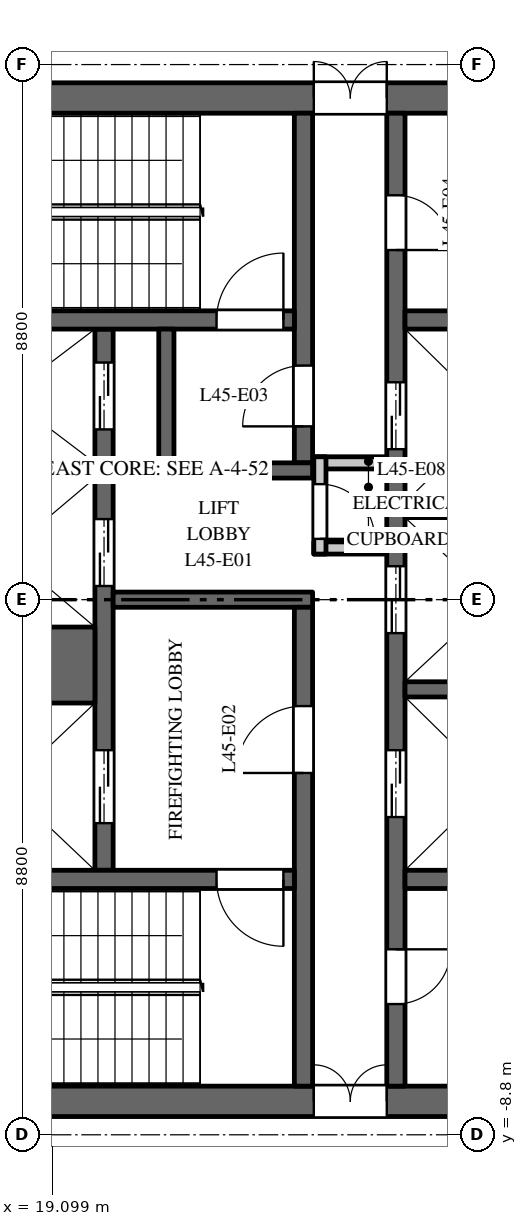
"""IFC4 building model, lengths in metres.
Left out: names, types, materials, properties, quantities, classifications, styles, units other than length and angle.
Written with IfcOpenShell. Run it as: python <this file> out.ifc"""

import sys

from ifc_helpers import new_model, si_unit, direction, frame, frame_2d, origin, place, context, subcontext, project, spatial, rectangle, extrude, element, fill, save


model = new_model("IFC4")
c1 = context("Model", 3, precision=1e-05, world=origin(), true_north=direction((0.0, 1.0)))
c2 = subcontext(c1, "Body", "Model", "MODEL_VIEW")
j1 = project(units=[si_unit("LENGTHUNIT", "METRE"), si_unit("PLANEANGLEUNIT", "RADIAN")], contexts=[c1])
p1 = place(None, origin())
s1 = spatial("IfcSite", under=j1, at=p1, CompositionType="ELEMENT")
p2 = place(p1, origin())
s2 = spatial("IfcBuilding", under=s1, at=p2, CompositionType="ELEMENT")
p3 = place(p2, frame((0.0, 0.0, 194.0)))
s3 = spatial("IfcBuildingStorey", under=s2, at=p3, CompositionType="ELEMENT", Elevation=194.0)
p4 = place(p3, frame((16.5, 8.25, 0.0), z_axis=(0.0, 0.0, 1.0), x_axis=(1.0, 0.0, 0.0)))
e1 = element("IfcWall", 1, at=p4, inside=s3, PredefinedType="SHEAR", context=c2, shape_type="SweptSolid", body=[
    extrude(rectangle(XDim=15.0, YDim=0.5, at=frame_2d((7.5, 0.0))), origin(), (0.0, 0.0, 1.0), 3.7),
])
p5 = place(p4, frame((6.9, 0.0, 0.0)))
e2 = element("IfcOpeningElement", 2, at=p5, cuts=e1, PredefinedType="OPENING", context=c2, shape_type="SweptSolid", body=[
    extrude(rectangle(XDim=1.2, YDim=2.1, at=frame_2d((0.6, 1.05))), frame((0.0, 0.26, 0.0), z_axis=(0.0, -1.0, 0.0), x_axis=(1.0, 0.0, 0.0)), (0.0, 0.0, 1.0), 0.52),
])
p6 = place(p4, frame((12.05, 0.0, 0.0)))
e3 = element("IfcOpeningElement", 3, at=p6, cuts=e1, PredefinedType="OPENING", context=c2, shape_type="SweptSolid", body=[
    extrude(rectangle(XDim=0.9, YDim=2.1, at=frame_2d((0.45, 1.05))), frame((0.0, 0.26, 0.0), z_axis=(0.0, -1.0, 0.0), x_axis=(1.0, 0.0, 0.0)), (0.0, 0.0, 1.0), 0.52),
])
p7 = place(p3, frame((16.5, -8.25, 0.0), z_axis=(0.0, 0.0, 1.0), x_axis=(1.0, 0.0, 0.0)))
e4 = element("IfcWall", 4, at=p7, inside=s3, PredefinedType="SHEAR", context=c2, shape_type="SweptSolid", body=[
    extrude(rectangle(XDim=15.0, YDim=0.5, at=frame_2d((7.5, 0.0))), origin(), (0.0, 0.0, 1.0), 3.7),
])
p8 = place(p7, frame((6.9, 0.0, 0.0)))
e5 = element("IfcOpeningElement", 5, at=p8, cuts=e4, PredefinedType="OPENING", context=c2, shape_type="SweptSolid", body=[
    extrude(rectangle(XDim=1.2, YDim=2.1, at=frame_2d((0.6, 1.05))), frame((0.0, 0.26, 0.0), z_axis=(0.0, -1.0, 0.0), x_axis=(1.0, 0.0, 0.0)), (0.0, 0.0, 1.0), 0.52),
])
p9 = place(p7, frame((12.425, 0.0, 0.0)))
e6 = element("IfcOpeningElement", 6, at=p9, cuts=e4, PredefinedType="OPENING", context=c2, shape_type="SweptSolid", body=[
    extrude(rectangle(XDim=0.9, YDim=2.1, at=frame_2d((0.45, 1.05))), frame((0.0, 0.26, 0.0), z_axis=(0.0, -1.0, 0.0), x_axis=(1.0, 0.0, 0.0)), (0.0, 0.0, 1.0), 0.52),
])
p10 = place(p3, frame((19.95, -4.45, 0.0), z_axis=(0.0, 0.0, 1.0), x_axis=(0.0, 1.0, 0.0)))
e7 = element("IfcWall", 7, at=p10, inside=s3, PredefinedType="SHEAR", context=c2, shape_type="SweptSolid", body=[
    extrude(rectangle(XDim=8.9, YDim=0.3, at=frame_2d((4.45, 0.0))), origin(), (0.0, 0.0, 1.0), 3.7),
])
p11 = place(p10, frame((0.775, 0.0, 0.0)))
e8 = element("IfcOpeningElement", 8, at=p11, cuts=e7, PredefinedType="OPENING", context=c2, shape_type="SweptSolid", body=[
    extrude(rectangle(XDim=1.2, YDim=2.1, at=frame_2d((0.6, 1.05))), frame((0.0, 0.16, 0.0), z_axis=(0.0, -1.0, 0.0), x_axis=(1.0, 0.0, 0.0)), (0.0, 0.0, 1.0), 0.32),
])
p12 = place(p10, frame((4.675, 0.0, 0.0)))
e9 = element("IfcOpeningElement", 9, at=p12, cuts=e7, PredefinedType="OPENING", context=c2, shape_type="SweptSolid", body=[
    extrude(rectangle(XDim=1.1, YDim=2.1, at=frame_2d((0.55, 1.05))), frame((0.0, 0.16, 0.0), z_axis=(0.0, -1.0, 0.0), x_axis=(1.0, 0.0, 0.0)), (0.0, 0.0, 1.0), 0.32),
])
p13 = place(p10, frame((7.25, 0.0, 0.0)))
e10 = element("IfcOpeningElement", 10, at=p13, cuts=e7, PredefinedType="OPENING", context=c2, shape_type="SweptSolid", body=[
    extrude(rectangle(XDim=1.1, YDim=2.1, at=frame_2d((0.55, 1.05))), frame((0.0, 0.16, 0.0), z_axis=(0.0, -1.0, 0.0), x_axis=(1.0, 0.0, 0.0)), (0.0, 0.0, 1.0), 0.32),
])
p14 = place(p3, frame((24.75, -8.0, 0.0), z_axis=(0.0, 0.0, 1.0), x_axis=(0.0, 1.0, 0.0)))
e11 = element("IfcWall", 11, at=p14, inside=s3, PredefinedType="SHEAR", context=c2, shape_type="SweptSolid", body=[
    extrude(rectangle(XDim=16.0, YDim=0.3, at=frame_2d((8.0, 0.0))), origin(), (0.0, 0.0, 1.0), 3.7),
])
p15 = place(p14, frame((4.425, 0.0, 0.0)))
e12 = element("IfcOpeningElement", 12, at=p15, cuts=e11, PredefinedType="OPENING", context=c2, shape_type="SweptSolid", body=[
    extrude(rectangle(XDim=1.1, YDim=2.1, at=frame_2d((0.55, 1.05))), frame((0.0, 0.16, 0.0), z_axis=(0.0, -1.0, 0.0), x_axis=(1.0, 0.0, 0.0)), (0.0, 0.0, 1.0), 0.32),
])
p16 = place(p14, frame((7.45, 0.0, 0.0)))
e13 = element("IfcOpeningElement", 13, at=p16, cuts=e11, PredefinedType="OPENING", context=c2, shape_type="SweptSolid", body=[
    extrude(rectangle(XDim=1.1, YDim=2.1, at=frame_2d((0.55, 1.05))), frame((0.0, 0.16, 0.0), z_axis=(0.0, -1.0, 0.0), x_axis=(1.0, 0.0, 0.0)), (0.0, 0.0, 1.0), 0.32),
])
p17 = place(p14, frame((10.475, 0.0, 0.0)))
e14 = element("IfcOpeningElement", 14, at=p17, cuts=e11, PredefinedType="OPENING", context=c2, shape_type="SweptSolid", body=[
    extrude(rectangle(XDim=1.1, YDim=2.1, at=frame_2d((0.55, 1.05))), frame((0.0, 0.16, 0.0), z_axis=(0.0, -1.0, 0.0), x_axis=(1.0, 0.0, 0.0)), (0.0, 0.0, 1.0), 0.32),
])
p18 = place(p14, frame((13.75, 0.0, 0.0)))
e15 = element("IfcOpeningElement", 15, at=p18, cuts=e11, PredefinedType="OPENING", context=c2, shape_type="SweptSolid", body=[
    extrude(rectangle(XDim=0.9, YDim=2.1, at=frame_2d((0.45, 1.05))), frame((0.0, 0.16, 0.0), z_axis=(0.0, -1.0, 0.0), x_axis=(1.0, 0.0, 0.0)), (0.0, 0.0, 1.0), 0.32),
])
p19 = place(p14, frame((1.35, 0.0, 0.0)))
e16 = element("IfcOpeningElement", 16, at=p19, cuts=e11, PredefinedType="OPENING", context=c2, shape_type="SweptSolid", body=[
    extrude(rectangle(XDim=0.9, YDim=2.1, at=frame_2d((0.45, 1.05))), frame((0.0, 0.16, 0.0), z_axis=(0.0, -1.0, 0.0), x_axis=(1.0, 0.0, 0.0)), (0.0, 0.0, 1.0), 0.32),
])
p20 = place(p3, frame((20.1, 0.0, 0.0), z_axis=(0.0, 0.0, 1.0), x_axis=(1.0, 0.0, 0.0)))
e17 = element("IfcWall", 17, at=p20, inside=s3, PredefinedType="SHEAR", context=c2, shape_type="SweptSolid", body=[
    extrude(rectangle(XDim=3.28, YDim=0.25, at=frame_2d((1.64, 0.0))), origin(), (0.0, 0.0, 1.0), 3.7),
])
for number, where, z_axis, x_axis in (
    (18, (23.4, 0.85, 0.0), (0.0, 0.0, 1.0), (1.0, 0.0, 0.0)),
    (19, (23.4, 2.25, 0.0), (0.0, 0.0, 1.0), (1.0, 0.0, 0.0)),
):
    element("IfcWall", number, at=place(p3, frame(where, z_axis=z_axis, x_axis=x_axis)), inside=s3, PredefinedType="PARTITIONING", context=c2, shape_type="SweptSolid", body=[
        extrude(rectangle(XDim=1.2, YDim=0.2, at=frame_2d((0.6, 0.0))), origin(), (0.0, 0.0, 1.0), 3.7),
    ])
p21 = place(p3, frame((23.5, 0.75, 0.0), z_axis=(0.0, 0.0, 1.0), x_axis=(0.0, 1.0, 0.0)))
e20 = element("IfcWall", 20, at=p21, inside=s3, PredefinedType="PARTITIONING", context=c2, shape_type="SweptSolid", body=[
    extrude(rectangle(XDim=1.6, YDim=0.2, at=frame_2d((0.8, 0.0))), origin(), (0.0, 0.0, 1.0), 3.7),
])
p22 = place(p21, frame((0.25, 0.0, 0.0)))
e21 = element("IfcOpeningElement", 21, at=p22, cuts=e20, PredefinedType="OPENING", context=c2, shape_type="SweptSolid", body=[
    extrude(rectangle(XDim=0.9, YDim=2.1, at=frame_2d((0.45, 1.05))), frame((0.0, 0.11, 0.0), z_axis=(0.0, -1.0, 0.0), x_axis=(1.0, 0.0, 0.0)), (0.0, 0.0, 1.0), 0.22),
])
p23 = place(p3, frame((24.9, 4.6, 0.0), z_axis=(0.0, 0.0, 1.0), x_axis=(1.0, 0.0, 0.0)))
e22 = element("IfcWall", 22, at=p23, inside=s3, PredefinedType="SHEAR", context=c2, shape_type="SweptSolid", body=[
    extrude(rectangle(XDim=6.1, YDim=0.3, at=frame_2d((3.05, 0.0))), origin(), (0.0, 0.0, 1.0), 3.7),
])
p24 = place(p23, frame((4.2, 0.0, 0.0)))
e23 = element("IfcOpeningElement", 23, at=p24, cuts=e22, PredefinedType="OPENING", context=c2, shape_type="SweptSolid", body=[
    extrude(rectangle(XDim=0.9, YDim=2.1, at=frame_2d((0.45, 1.05))), frame((0.0, 0.16, 0.0), z_axis=(0.0, -1.0, 0.0), x_axis=(1.0, 0.0, 0.0)), (0.0, 0.0, 1.0), 0.32),
])
p25 = place(p3, frame((24.9, -4.6, 0.0), z_axis=(0.0, 0.0, 1.0), x_axis=(1.0, 0.0, 0.0)))
e24 = element("IfcWall", 24, at=p25, inside=s3, PredefinedType="SHEAR", context=c2, shape_type="SweptSolid", body=[
    extrude(rectangle(XDim=6.1, YDim=0.3, at=frame_2d((3.05, 0.0))), origin(), (0.0, 0.0, 1.0), 3.7),
])
p26 = place(p3, frame((16.9, -1.075, 0.0), z_axis=(0.0, 0.0, 1.0), x_axis=(1.0, 0.0, 0.0)))
e25 = element("IfcWall", 25, at=p26, inside=s3, PredefinedType="SHEAR", context=c2, shape_type="SweptSolid", body=[
    extrude(rectangle(XDim=2.9, YDim=1.25, at=frame_2d((1.45, 0.0))), origin(), (0.0, 0.0, 1.0), 3.7),
])
for number, where, z_axis, x_axis in (
    (26, (16.9, 2.125, 0.0), (0.0, 0.0, 1.0), (1.0, 0.0, 0.0)),
    (27, (24.9, -1.475, 0.0), (0.0, 0.0, 1.0), (1.0, 0.0, 0.0)),
    (28, (24.9, 1.475, 0.0), (0.0, 0.0, 1.0), (1.0, 0.0, 0.0)),
):
    element("IfcWall", number, at=place(p3, frame(where, z_axis=z_axis, x_axis=x_axis)), inside=s3, PredefinedType="SHEAR", context=c2, shape_type="SweptSolid", body=[
        extrude(rectangle(XDim=2.9, YDim=0.25, at=frame_2d((1.45, 0.0))), origin(), (0.0, 0.0, 1.0), 3.7),
    ])
p27 = place(p3, frame((23.23, 2.25, 0.0), z_axis=(0.0, 0.0, 1.0), x_axis=(0.0, 1.0, 0.0)))
e29 = element("IfcWall", 29, at=p27, inside=s3, PredefinedType="SHEAR", context=c2, shape_type="SweptSolid", body=[
    extrude(rectangle(XDim=5.75, YDim=0.3, at=frame_2d((2.875, 0.0))), origin(), (0.0, 0.0, 1.0), 3.7),
])
p28 = place(p27, frame((0.6, 0.0, 0.0)))
e30 = element("IfcOpeningElement", 30, at=p28, cuts=e29, PredefinedType="OPENING", context=c2, shape_type="SweptSolid", body=[
    extrude(rectangle(XDim=1.0, YDim=2.1, at=frame_2d((0.5, 1.05))), frame((0.0, 0.16, 0.0), z_axis=(0.0, -1.0, 0.0), x_axis=(1.0, 0.0, 0.0)), (0.0, 0.0, 1.0), 0.32),
])
p29 = place(p3, frame((23.23, -8.0, 0.0), z_axis=(0.0, 0.0, 1.0), x_axis=(0.0, 1.0, 0.0)))
e31 = element("IfcWall", 31, at=p29, inside=s3, PredefinedType="SHEAR", context=c2, shape_type="SweptSolid", body=[
    extrude(rectangle(XDim=7.875, YDim=0.3, at=frame_2d((3.938, 0.0))), origin(), (0.0, 0.0, 1.0), 3.7),
])
p30 = place(p29, frame((5.15, 0.0, 0.0)))
e32 = element("IfcOpeningElement", 32, at=p30, cuts=e31, PredefinedType="OPENING", context=c2, shape_type="SweptSolid", body=[
    extrude(rectangle(XDim=1.1, YDim=2.1, at=frame_2d((0.55, 1.05))), frame((0.0, 0.16, 0.0), z_axis=(0.0, -1.0, 0.0), x_axis=(1.0, 0.0, 0.0)), (0.0, 0.0, 1.0), 0.32),
])
p31 = place(p3, frame((16.9, 4.6, 0.0), z_axis=(0.0, 0.0, 1.0), x_axis=(1.0, 0.0, 0.0)))
e33 = element("IfcWall", 33, at=p31, inside=s3, PredefinedType="SHEAR", context=c2, shape_type="SweptSolid", body=[
    extrude(rectangle(XDim=6.18, YDim=0.3, at=frame_2d((3.09, 0.0))), origin(), (0.0, 0.0, 1.0), 3.7),
])
p32 = place(p31, frame((4.9, 0.0, 0.0)))
e34 = element("IfcOpeningElement", 34, at=p32, cuts=e33, PredefinedType="OPENING", context=c2, shape_type="SweptSolid", body=[
    extrude(rectangle(XDim=1.1, YDim=2.1, at=frame_2d((0.55, 1.05))), frame((0.0, 0.16, 0.0), z_axis=(0.0, -1.0, 0.0), x_axis=(1.0, 0.0, 0.0)), (0.0, 0.0, 1.0), 0.32),
])
p33 = place(p3, frame((16.9, -4.6, 0.0), z_axis=(0.0, 0.0, 1.0), x_axis=(1.0, 0.0, 0.0)))
e35 = element("IfcWall", 35, at=p33, inside=s3, PredefinedType="SHEAR", context=c2, shape_type="SweptSolid", body=[
    extrude(rectangle(XDim=6.18, YDim=0.3, at=frame_2d((3.09, 0.0))), origin(), (0.0, 0.0, 1.0), 3.7),
])
p34 = place(p33, frame((4.9, 0.0, 0.0)))
e36 = element("IfcOpeningElement", 36, at=p34, cuts=e35, PredefinedType="OPENING", context=c2, shape_type="SweptSolid", body=[
    extrude(rectangle(XDim=1.1, YDim=2.1, at=frame_2d((0.55, 1.05))), frame((0.0, 0.16, 0.0), z_axis=(0.0, -1.0, 0.0), x_axis=(1.0, 0.0, 0.0)), (0.0, 0.0, 1.0), 0.32),
])
p35 = place(p3, frame((20.85, 2.125, 0.0), z_axis=(0.0, 0.0, 1.0), x_axis=(1.0, 0.0, 0.0)))
e37 = element("IfcWall", 37, at=p35, inside=s3, PredefinedType="SHEAR", context=c2, shape_type="SweptSolid", body=[
    extrude(rectangle(XDim=2.53, YDim=0.25, at=frame_2d((1.265, 0.0))), origin(), (0.0, 0.0, 1.0), 3.7),
])
p36 = place(p3, frame((20.975, 2.25, 0.0), z_axis=(0.0, 0.0, 1.0), x_axis=(0.0, 1.0, 0.0)))
e38 = element("IfcWall", 38, at=p36, inside=s3, PredefinedType="SHEAR", context=c2, shape_type="SweptSolid", body=[
    extrude(rectangle(XDim=2.2, YDim=0.25, at=frame_2d((1.1, 0.0))), origin(), (0.0, 0.0, 1.0), 3.7),
])
p37 = place(p3, frame((7.765, -8.662, 0.0), z_axis=(0.0, 0.0, 1.0), x_axis=(0.925461374611, -0.378841977747, 0.0)))
e39 = element("IfcWall", 39, at=p37, inside=s3, PredefinedType="PARTITIONING", context=c2, shape_type="SweptSolid", body=[
    extrude(rectangle(XDim=13.818, YDim=0.1, at=frame_2d((6.909, 0.0))), origin(), (0.0, 0.0, 1.0), 3.7),
])
p38 = place(p11, origin())
e40 = element("IfcDoor", 40, at=p38, inside=s3, OperationType="DOUBLE_DOOR_SLIDING", PredefinedType="DOOR", context=c2, shape_type="SweptSolid", body=[
    extrude(rectangle(XDim=1.2, YDim=2.1, at=frame_2d((0.6, 1.05))), frame((0.0, 0.025, 0.0), z_axis=(0.0, -1.0, 0.0), x_axis=(1.0, 0.0, 0.0)), (0.0, 0.0, 1.0), 0.05),
])
fill(e8, e40)
p39 = place(p12, origin())
e41 = element("IfcDoor", 41, at=p39, inside=s3, OperationType="DOUBLE_DOOR_SLIDING", PredefinedType="DOOR", context=c2, shape_type="SweptSolid", body=[
    extrude(rectangle(XDim=1.1, YDim=2.1, at=frame_2d((0.55, 1.05))), frame((0.0, 0.025, 0.0), z_axis=(0.0, -1.0, 0.0), x_axis=(1.0, 0.0, 0.0)), (0.0, 0.0, 1.0), 0.05),
])
fill(e9, e41)
p40 = place(p13, origin())
e42 = element("IfcDoor", 42, at=p40, inside=s3, OperationType="DOUBLE_DOOR_SLIDING", PredefinedType="DOOR", context=c2, shape_type="SweptSolid", body=[
    extrude(rectangle(XDim=1.1, YDim=2.1, at=frame_2d((0.55, 1.05))), frame((0.0, 0.025, 0.0), z_axis=(0.0, -1.0, 0.0), x_axis=(1.0, 0.0, 0.0)), (0.0, 0.0, 1.0), 0.05),
])
fill(e10, e42)
p41 = place(p15, origin())
e43 = element("IfcDoor", 43, at=p41, inside=s3, OperationType="DOUBLE_DOOR_SLIDING", PredefinedType="DOOR", context=c2, shape_type="SweptSolid", body=[
    extrude(rectangle(XDim=1.1, YDim=2.1, at=frame_2d((0.55, 1.05))), frame((0.0, 0.025, 0.0), z_axis=(0.0, -1.0, 0.0), x_axis=(1.0, 0.0, 0.0)), (0.0, 0.0, 1.0), 0.05),
])
fill(e12, e43)
p42 = place(p16, origin())
e44 = element("IfcDoor", 44, at=p42, inside=s3, OperationType="DOUBLE_DOOR_SLIDING", PredefinedType="DOOR", context=c2, shape_type="SweptSolid", body=[
    extrude(rectangle(XDim=1.1, YDim=2.1, at=frame_2d((0.55, 1.05))), frame((0.0, 0.025, 0.0), z_axis=(0.0, -1.0, 0.0), x_axis=(1.0, 0.0, 0.0)), (0.0, 0.0, 1.0), 0.05),
])
fill(e13, e44)
p43 = place(p17, origin())
e45 = element("IfcDoor", 45, at=p43, inside=s3, OperationType="DOUBLE_DOOR_SLIDING", PredefinedType="DOOR", context=c2, shape_type="SweptSolid", body=[
    extrude(rectangle(XDim=1.1, YDim=2.1, at=frame_2d((0.55, 1.05))), frame((0.0, 0.025, 0.0), z_axis=(0.0, -1.0, 0.0), x_axis=(1.0, 0.0, 0.0)), (0.0, 0.0, 1.0), 0.05),
])
fill(e14, e45)
p44 = place(p32, origin())
e46 = element("IfcDoor", 46, at=p44, inside=s3, OperationType="SINGLE_SWING_LEFT", PredefinedType="DOOR", context=c2, shape_type="SweptSolid", body=[
    extrude(rectangle(XDim=1.1, YDim=2.1, at=frame_2d((0.55, 1.05))), frame((0.0, 0.025, 0.0), z_axis=(0.0, -1.0, 0.0), x_axis=(1.0, 0.0, 0.0)), (0.0, 0.0, 1.0), 0.05),
])
fill(e34, e46)
p45 = place(p34, origin())
e47 = element("IfcDoor", 47, at=p45, inside=s3, OperationType="SINGLE_SWING_RIGHT", PredefinedType="DOOR", context=c2, shape_type="SweptSolid", body=[
    extrude(rectangle(XDim=1.1, YDim=2.1, at=frame_2d((0.55, 1.05))), frame((0.0, 0.025, 0.0), z_axis=(0.0, -1.0, 0.0), x_axis=(1.0, 0.0, 0.0)), (0.0, 0.0, 1.0), 0.05),
])
fill(e36, e47)
p46 = place(p30, origin())
e48 = element("IfcDoor", 48, at=p46, inside=s3, OperationType="SINGLE_SWING_RIGHT", PredefinedType="DOOR", context=c2, shape_type="SweptSolid", body=[
    extrude(rectangle(XDim=1.1, YDim=2.1, at=frame_2d((0.55, 1.05))), frame((0.0, 0.025, 0.0), z_axis=(0.0, -1.0, 0.0), x_axis=(1.0, 0.0, 0.0)), (0.0, 0.0, 1.0), 0.05),
])
fill(e32, e48)
p47 = place(p28, origin())
e49 = element("IfcDoor", 49, at=p47, inside=s3, OperationType="SINGLE_SWING_RIGHT", PredefinedType="DOOR", context=c2, shape_type="SweptSolid", body=[
    extrude(rectangle(XDim=1.0, YDim=2.1, at=frame_2d((0.5, 1.05))), frame((0.0, 0.025, 0.0), z_axis=(0.0, -1.0, 0.0), x_axis=(1.0, 0.0, 0.0)), (0.0, 0.0, 1.0), 0.05),
])
fill(e30, e49)
p48 = place(p5, origin())
e50 = element("IfcDoor", 50, at=p48, inside=s3, OperationType="DOUBLE_DOOR_DOUBLE_SWING", PredefinedType="DOOR", context=c2, shape_type="SweptSolid", body=[
    extrude(rectangle(XDim=1.2, YDim=2.1, at=frame_2d((0.6, 1.05))), frame((0.0, 0.025, 0.0), z_axis=(0.0, -1.0, 0.0), x_axis=(1.0, 0.0, 0.0)), (0.0, 0.0, 1.0), 0.05),
])
fill(e2, e50)
p49 = place(p8, origin())
e51 = element("IfcDoor", 51, at=p49, inside=s3, OperationType="DOUBLE_DOOR_DOUBLE_SWING", PredefinedType="DOOR", context=c2, shape_type="SweptSolid", body=[
    extrude(rectangle(XDim=1.2, YDim=2.1, at=frame_2d((0.6, 1.05))), frame((0.0, 0.025, 0.0), z_axis=(0.0, -1.0, 0.0), x_axis=(1.0, 0.0, 0.0)), (0.0, 0.0, 1.0), 0.05),
])
fill(e5, e51)
p50 = place(p18, origin())
e52 = element("IfcDoor", 52, at=p50, inside=s3, OperationType="SINGLE_SWING_LEFT", PredefinedType="DOOR", context=c2, shape_type="SweptSolid", body=[
    extrude(rectangle(XDim=0.9, YDim=2.1, at=frame_2d((0.45, 1.05))), frame((0.0, 0.025, 0.0), z_axis=(0.0, -1.0, 0.0), x_axis=(1.0, 0.0, 0.0)), (0.0, 0.0, 1.0), 0.05),
])
fill(e15, e52)
p51 = place(p19, origin())
e53 = element("IfcDoor", 53, at=p51, inside=s3, OperationType="SINGLE_SWING_RIGHT", PredefinedType="DOOR", context=c2, shape_type="SweptSolid", body=[
    extrude(rectangle(XDim=0.9, YDim=2.1, at=frame_2d((0.45, 1.05))), frame((0.0, 0.025, 0.0), z_axis=(0.0, -1.0, 0.0), x_axis=(1.0, 0.0, 0.0)), (0.0, 0.0, 1.0), 0.05),
])
fill(e16, e53)
p52 = place(p22, origin())
e54 = element("IfcDoor", 54, at=p52, inside=s3, OperationType="SINGLE_SWING_LEFT", PredefinedType="DOOR", context=c2, shape_type="SweptSolid", body=[
    extrude(rectangle(XDim=0.9, YDim=2.1, at=frame_2d((0.45, 1.05))), frame((0.0, 0.025, 0.0), z_axis=(0.0, -1.0, 0.0), x_axis=(1.0, 0.0, 0.0)), (0.0, 0.0, 1.0), 0.05),
])
fill(e21, e54)
save(model, sys.argv[1])
